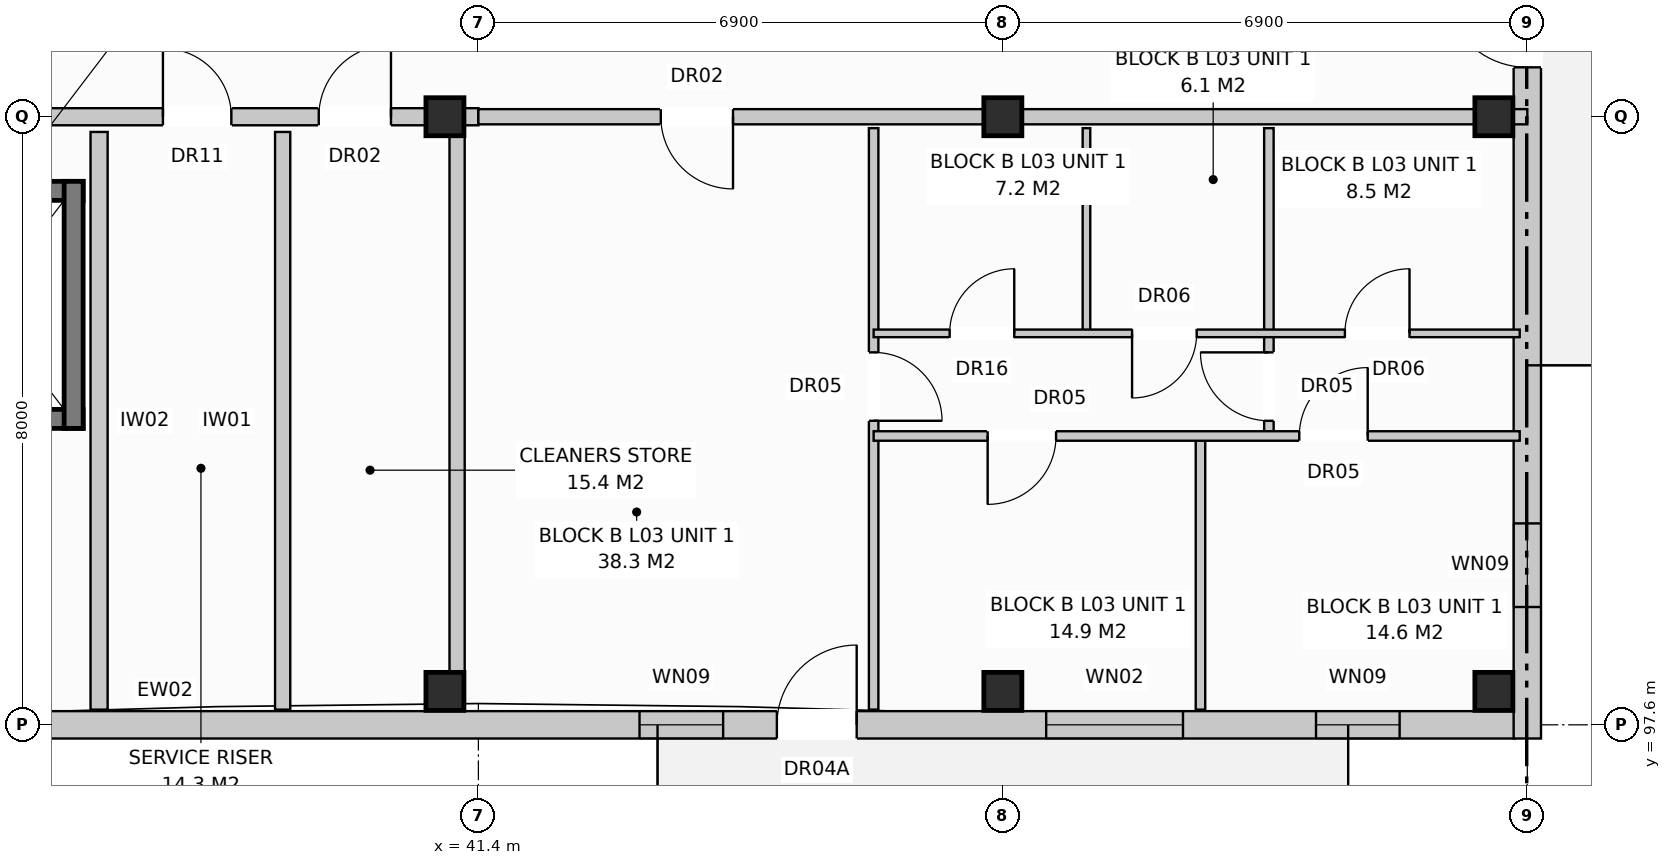
"""IFC4 building model, lengths in metres.
Left out: names, types, materials, properties, quantities, classifications, styles, units other than length and angle.
Written with IfcOpenShell. Run it as: python <this file> out.ifc"""

import sys

from ifc_helpers import new_model, si_unit, direction, frame, frame_2d, origin, origin_with_axes, origin_2d, place, context, subcontext, project, spatial, rectangle, extrude, element, fill, save


model = new_model("IFC4")
c1 = context("Model", 3, precision=1e-05, world=origin(), true_north=direction((0.0, 1.0)))
c2 = subcontext(c1, "Body", "Model", "MODEL_VIEW")
j1 = project(units=[si_unit("LENGTHUNIT", "METRE"), si_unit("PLANEANGLEUNIT", "RADIAN")], contexts=[c1])
p1 = place(None, origin())
s1 = spatial("IfcSite", under=j1, at=p1, CompositionType="ELEMENT")
p2 = place(p1, origin())
s2 = spatial("IfcBuilding", under=s1, at=p2, CompositionType="ELEMENT")
p3 = place(p2, frame((0.0, 0.0, 11.2)))
s3 = spatial("IfcBuildingStorey", under=s2, at=p3, CompositionType="ELEMENT", Elevation=11.2)
for number, where, z_axis, x_axis in (
    (1, (40.96, 98.04, 0.0), (0.0, 0.0, 1.0), (1.0, 0.0, 0.0)),
    (2, (40.96, 105.6, 0.0), (0.0, 0.0, 1.0), (1.0, 0.0, 0.0)),
    (3, (48.3, 98.04, 0.0), (0.0, 0.0, 1.0), (1.0, 0.0, 0.0)),
    (4, (48.3, 105.6, 0.0), (0.0, 0.0, 1.0), (1.0, 0.0, 0.0)),
    (5, (54.76, 98.04, 0.0), (0.0, 0.0, 1.0), (1.0, 0.0, 0.0)),
    (6, (54.76, 105.6, 0.0), (0.0, 0.0, 1.0), (1.0, 0.0, 0.0)),
):
    element("IfcColumn", number, at=place(p3, frame(where, z_axis=z_axis, x_axis=x_axis)), inside=s3, PredefinedType="COLUMN", context=c2, shape_type="SweptSolid", body=[
        extrude(rectangle(XDim=0.5, YDim=0.5, at=origin_2d()), origin(), (0.0, 0.0, 1.0), 3.2),
    ])
p4 = place(p3, frame((31.35, 97.6, 0.0), z_axis=(0.0, 0.0, 1.0), x_axis=(1.0, 0.0, 0.0)))
e7 = element("IfcWall", 7, at=p4, inside=s3, PredefinedType="STANDARD", context=c2, shape_type="SweptSolid", body=[
    extrude(rectangle(XDim=23.68, YDim=0.36, at=frame_2d((11.84, 0.0))), origin(), (0.0, 0.0, 1.0), 2.94),
])
p5 = place(p4, frame((13.977, 0.0, 0.0)))
e8 = element("IfcOpeningElement", 8, at=p5, cuts=e7, PredefinedType="OPENING", context=c2, shape_type="SweptSolid", body=[
    extrude(rectangle(XDim=1.05, YDim=2.12, at=frame_2d((0.525, 1.06))), frame((0.0, 0.192, 0.0), z_axis=(0.0, -1.0, 0.0), x_axis=(1.0, 0.0, 0.0)), (0.0, 0.0, 1.0), 0.384),
])
p6 = place(p4, frame((12.17, 0.0, 0.72)))
e9 = element("IfcOpeningElement", 9, at=p6, cuts=e7, PredefinedType="OPENING", context=c2, shape_type="SweptSolid", body=[
    extrude(rectangle(XDim=1.1, YDim=1.5, at=frame_2d((0.55, 0.75))), frame((0.0, 0.192, 0.0), z_axis=(0.0, -1.0, 0.0), x_axis=(1.0, 0.0, 0.0)), (0.0, 0.0, 1.0), 0.384),
])
p7 = place(p4, frame((17.52, 0.0, 0.8)))
e10 = element("IfcOpeningElement", 10, at=p7, cuts=e7, PredefinedType="OPENING", context=c2, shape_type="SweptSolid", body=[
    extrude(rectangle(XDim=1.8, YDim=1.7, at=frame_2d((0.9, 0.85))), frame((0.0, 0.192, 0.0), z_axis=(0.0, -1.0, 0.0), x_axis=(1.0, 0.0, 0.0)), (0.0, 0.0, 1.0), 0.384),
])
p8 = place(p4, frame((21.07, 0.0, 0.72)))
e11 = element("IfcOpeningElement", 11, at=p8, cuts=e7, PredefinedType="OPENING", context=c2, shape_type="SweptSolid", body=[
    extrude(rectangle(XDim=1.1, YDim=1.5, at=frame_2d((0.55, 0.75))), frame((0.0, 0.192, 0.0), z_axis=(0.0, -1.0, 0.0), x_axis=(1.0, 0.0, 0.0)), (0.0, 0.0, 1.0), 0.384),
])
p9 = place(p3, frame((55.2, 97.42, 0.0), z_axis=(0.0, 0.0, 1.0), x_axis=(0.0, 1.0, 0.0)))
e12 = element("IfcWall", 12, at=p9, inside=s3, PredefinedType="STANDARD", context=c2, shape_type="SweptSolid", body=[
    extrude(rectangle(XDim=18.76, YDim=0.36, at=frame_2d((9.38, 0.0))), origin(), (0.0, 0.0, 1.0), 2.94),
])
p10 = place(p9, frame((8.83, 0.0, 0.0)))
e13 = element("IfcOpeningElement", 13, at=p10, cuts=e12, PredefinedType="OPENING", context=c2, shape_type="SweptSolid", body=[
    extrude(rectangle(XDim=1.1, YDim=2.1, at=frame_2d((0.55, 1.05))), frame((0.0, 0.192, 0.0), z_axis=(0.0, -1.0, 0.0), x_axis=(1.0, 0.0, 0.0)), (0.0, 0.0, 1.0), 0.384),
])
p11 = place(p9, frame((1.73, 0.0, 0.72)))
e14 = element("IfcOpeningElement", 14, at=p11, cuts=e12, PredefinedType="OPENING", context=c2, shape_type="SweptSolid", body=[
    extrude(rectangle(XDim=1.1, YDim=1.5, at=frame_2d((0.55, 0.75))), frame((0.0, 0.192, 0.0), z_axis=(0.0, -1.0, 0.0), x_axis=(1.0, 0.0, 0.0)), (0.0, 0.0, 1.0), 0.384),
])
p12 = place(p9, frame((15.93, 0.0, 0.72)))
e15 = element("IfcOpeningElement", 15, at=p12, cuts=e12, PredefinedType="OPENING", context=c2, shape_type="SweptSolid", body=[
    extrude(rectangle(XDim=1.1, YDim=1.5, at=frame_2d((0.55, 0.75))), frame((0.0, 0.192, 0.0), z_axis=(0.0, -1.0, 0.0), x_axis=(1.0, 0.0, 0.0)), (0.0, 0.0, 1.0), 0.384),
])
p13 = place(p3, frame((33.6, 101.625, 0.0), z_axis=(0.0, 0.0, 1.0), x_axis=(1.0, 0.0, 0.0)))
e16 = element("IfcWall", 16, at=p13, inside=s3, PredefinedType="SHEAR", context=c2, shape_type="SweptSolid", body=[
    extrude(rectangle(XDim=2.6, YDim=0.25, at=frame_2d((1.3, 0.0))), origin(), (0.0, 0.0, 1.0), 2.94),
])
p14 = place(p13, frame((0.925, 0.0, 0.0)))
e17 = element("IfcOpeningElement", 17, at=p14, cuts=e16, PredefinedType="OPENING", context=c2, shape_type="SweptSolid", body=[
    extrude(rectangle(XDim=1.0, YDim=2.1, at=frame_2d((0.5, 1.05))), frame((0.0, 0.137, 0.0), z_axis=(0.0, -1.0, 0.0), x_axis=(1.0, 0.0, 0.0)), (0.0, 0.0, 1.0), 0.274),
])
p15 = place(p3, frame((33.6, 104.625, 0.0), z_axis=(0.0, 0.0, 1.0), x_axis=(1.0, 0.0, 0.0)))
e18 = element("IfcWall", 18, at=p15, inside=s3, PredefinedType="SHEAR", context=c2, shape_type="SweptSolid", body=[
    extrude(rectangle(XDim=2.6, YDim=0.25, at=frame_2d((1.3, 0.0))), origin(), (0.0, 0.0, 1.0), 2.94),
])
p16 = place(p3, frame((36.075, 101.5, 0.0), z_axis=(0.0, 0.0, 1.0), x_axis=(0.0, 1.0, 0.0)))
e19 = element("IfcWall", 19, at=p16, inside=s3, PredefinedType="SHEAR", context=c2, shape_type="SweptSolid", body=[
    extrude(rectangle(XDim=3.25, YDim=0.25, at=frame_2d((1.625, 0.0))), origin(), (0.0, 0.0, 1.0), 2.94),
])
p17 = place(p3, frame((36.41, 97.8, 0.0), z_axis=(0.0, 0.0, 1.0), x_axis=(0.0, 1.0, 0.0)))
e20 = element("IfcWall", 20, at=p17, inside=s3, PredefinedType="PARTITIONING", context=c2, shape_type="SweptSolid", body=[
    extrude(rectangle(XDim=7.6, YDim=0.225, at=frame_2d((3.8, 0.0))), origin(), (0.0, 0.0, 1.0), 2.59),
])
for number, where, z_axis, x_axis in (
    (21, (38.825, 97.8, 0.0), (0.0, 0.0, 1.0), (0.0, 1.0, 0.0)),
    (22, (41.12, 97.8, 0.0), (0.0, 0.0, 1.0), (0.0, 1.0, 0.0)),
):
    element("IfcWall", number, at=place(p3, frame(where, z_axis=z_axis, x_axis=x_axis)), inside=s3, PredefinedType="PARTITIONING", context=c2, shape_type="SweptSolid", body=[
        extrude(rectangle(XDim=7.6, YDim=0.2, at=frame_2d((3.8, 0.0))), origin(), (0.0, 0.0, 1.0), 2.94),
    ])
p18 = place(p3, frame((31.5, 105.6, 0.0), z_axis=(0.0, 0.0, 1.0), x_axis=(1.0, 0.0, 0.0)))
e23 = element("IfcWall", 23, at=p18, inside=s3, PredefinedType="PARTITIONING", context=c2, shape_type="SweptSolid", body=[
    extrude(rectangle(XDim=9.9, YDim=0.225, at=frame_2d((4.95, 0.0))), origin(), (0.0, 0.0, 1.0), 2.38),
])
p19 = place(p18, frame((0.475, 0.0, 0.0)))
e24 = element("IfcOpeningElement", 24, at=p19, cuts=e23, PredefinedType="OPENING", context=c2, shape_type="SweptSolid", body=[
    extrude(rectangle(XDim=1.1, YDim=2.15, at=frame_2d((0.55, 1.075))), frame((0.0, 0.125, 0.0), z_axis=(0.0, -1.0, 0.0), x_axis=(1.0, 0.0, 0.0)), (0.0, 0.0, 1.0), 0.249),
])
p20 = place(p18, frame((5.75, 0.0, 0.0)))
e25 = element("IfcOpeningElement", 25, at=p20, cuts=e23, PredefinedType="OPENING", context=c2, shape_type="SweptSolid", body=[
    extrude(rectangle(XDim=0.9, YDim=2.1, at=frame_2d((0.45, 1.05))), frame((0.0, 0.125, 0.0), z_axis=(0.0, -1.0, 0.0), x_axis=(1.0, 0.0, 0.0)), (0.0, 0.0, 1.0), 0.249),
])
p21 = place(p18, frame((7.8, 0.0, 0.0)))
e26 = element("IfcOpeningElement", 26, at=p21, cuts=e23, PredefinedType="OPENING", context=c2, shape_type="SweptSolid", body=[
    extrude(rectangle(XDim=0.95, YDim=2.15, at=frame_2d((0.475, 1.075))), frame((0.0, 0.125, 0.0), z_axis=(0.0, -1.0, 0.0), x_axis=(1.0, 0.0, 0.0)), (0.0, 0.0, 1.0), 0.249),
])
p22 = place(p3, frame((41.4, 105.6, 0.0), z_axis=(0.0, 0.0, 1.0), x_axis=(1.0, 0.0, 0.0)))
e27 = element("IfcWall", 27, at=p22, inside=s3, PredefinedType="PARTITIONING", context=c2, shape_type="SweptSolid", body=[
    extrude(rectangle(XDim=13.8, YDim=0.2, at=frame_2d((6.9, 0.0))), origin(), (0.0, 0.0, 1.0), 2.38),
])
p23 = place(p22, frame((2.4, 0.0, 0.0)))
e28 = element("IfcOpeningElement", 28, at=p23, cuts=e27, PredefinedType="OPENING", context=c2, shape_type="SweptSolid", body=[
    extrude(rectangle(XDim=0.95, YDim=2.15, at=frame_2d((0.475, 1.075))), frame((0.0, 0.112, 0.0), z_axis=(0.0, -1.0, 0.0), x_axis=(1.0, 0.0, 0.0)), (0.0, 0.0, 1.0), 0.224),
])
p24 = place(p3, frame((46.6, 105.45, 0.0), z_axis=(0.0, 0.0, 1.0), x_axis=(0.0, -1.0, 0.0)))
e29 = element("IfcWall", 29, at=p24, inside=s3, PredefinedType="PARTITIONING", context=c2, shape_type="SweptSolid", body=[
    extrude(rectangle(XDim=7.65, YDim=0.125, at=frame_2d((3.825, 0.0))), origin(), (0.0, 0.0, 1.0), 2.94),
])
p25 = place(p24, frame((2.95, 0.0, 0.0)))
e30 = element("IfcOpeningElement", 30, at=p25, cuts=e29, PredefinedType="OPENING", context=c2, shape_type="SweptSolid", body=[
    extrude(rectangle(XDim=0.9, YDim=2.1, at=frame_2d((0.45, 1.05))), frame((0.0, 0.074, 0.0), z_axis=(0.0, -1.0, 0.0), x_axis=(1.0, 0.0, 0.0)), (0.0, 0.0, 1.0), 0.149),
])
p26 = place(p3, frame((49.4, 105.45, 0.0), z_axis=(0.0, 0.0, 1.0), x_axis=(0.0, -1.0, 0.0)))
e31 = element("IfcWall", 31, at=p26, inside=s3, PredefinedType="PARTITIONING", context=c2, shape_type="SweptSolid", body=[
    extrude(rectangle(XDim=2.7, YDim=0.1, at=frame_2d((1.35, 0.0))), origin(), (0.0, 0.0, 1.0), 2.94),
])
p27 = place(p3, frame((51.8, 105.45, 0.0), z_axis=(0.0, 0.0, 1.0), x_axis=(0.0, -1.0, 0.0)))
e32 = element("IfcWall", 32, at=p27, inside=s3, PredefinedType="PARTITIONING", context=c2, shape_type="SweptSolid", body=[
    extrude(rectangle(XDim=4.05, YDim=0.125, at=frame_2d((2.025, 0.0))), origin(), (0.0, 0.0, 1.0), 2.94),
])
p28 = place(p27, frame((2.95, 0.0, 0.0)))
e33 = element("IfcOpeningElement", 33, at=p28, cuts=e32, PredefinedType="OPENING", context=c2, shape_type="SweptSolid", body=[
    extrude(rectangle(XDim=0.9, YDim=2.1, at=frame_2d((0.45, 1.05))), frame((0.0, 0.074, 0.0), z_axis=(0.0, -1.0, 0.0), x_axis=(1.0, 0.0, 0.0)), (0.0, 0.0, 1.0), 0.149),
])
p29 = place(p3, frame((50.9, 101.4, 0.0), z_axis=(0.0, 0.0, 1.0), x_axis=(0.0, -1.0, 0.0)))
e34 = element("IfcWall", 34, at=p29, inside=s3, PredefinedType="PARTITIONING", context=c2, shape_type="SweptSolid", body=[
    extrude(rectangle(XDim=3.6, YDim=0.125, at=frame_2d((1.8, 0.0))), origin(), (0.0, 0.0, 1.0), 2.94),
])
p30 = place(p3, frame((46.6, 102.75, 0.0), z_axis=(0.0, 0.0, 1.0), x_axis=(1.0, 0.0, 0.0)))
e35 = element("IfcWall", 35, at=p30, inside=s3, PredefinedType="PARTITIONING", context=c2, shape_type="SweptSolid", body=[
    extrude(rectangle(XDim=8.5, YDim=0.1, at=frame_2d((4.25, 0.0))), origin(), (0.0, 0.0, 1.0), 2.94),
])
p31 = place(p30, frame((1.0, 0.0, 0.0)))
e36 = element("IfcOpeningElement", 36, at=p31, cuts=e35, PredefinedType="OPENING", context=c2, shape_type="SweptSolid", body=[
    extrude(rectangle(XDim=0.85, YDim=2.1, at=frame_2d((0.425, 1.05))), frame((0.0, 0.062, 0.0), z_axis=(0.0, -1.0, 0.0), x_axis=(1.0, 0.0, 0.0)), (0.0, 0.0, 1.0), 0.124),
])
p32 = place(p30, frame((3.4, 0.0, 0.0)))
e37 = element("IfcOpeningElement", 37, at=p32, cuts=e35, PredefinedType="OPENING", context=c2, shape_type="SweptSolid", body=[
    extrude(rectangle(XDim=0.85, YDim=2.05, at=frame_2d((0.425, 1.025))), frame((0.0, 0.062, 0.0), z_axis=(0.0, -1.0, 0.0), x_axis=(1.0, 0.0, 0.0)), (0.0, 0.0, 1.0), 0.124),
])
p33 = place(p30, frame((6.2, 0.0, 0.0)))
e38 = element("IfcOpeningElement", 38, at=p33, cuts=e35, PredefinedType="OPENING", context=c2, shape_type="SweptSolid", body=[
    extrude(rectangle(XDim=0.85, YDim=2.05, at=frame_2d((0.425, 1.025))), frame((0.0, 0.062, 0.0), z_axis=(0.0, -1.0, 0.0), x_axis=(1.0, 0.0, 0.0)), (0.0, 0.0, 1.0), 0.124),
])
p34 = place(p3, frame((46.6, 101.4, 0.0), z_axis=(0.0, 0.0, 1.0), x_axis=(1.0, 0.0, 0.0)))
e39 = element("IfcWall", 39, at=p34, inside=s3, PredefinedType="PARTITIONING", context=c2, shape_type="SweptSolid", body=[
    extrude(rectangle(XDim=8.5, YDim=0.125, at=frame_2d((4.25, 0.0))), origin(), (0.0, 0.0, 1.0), 2.94),
])
p35 = place(p34, frame((1.5, 0.0, 0.0)))
e40 = element("IfcOpeningElement", 40, at=p35, cuts=e39, PredefinedType="OPENING", context=c2, shape_type="SweptSolid", body=[
    extrude(rectangle(XDim=0.9, YDim=2.1, at=frame_2d((0.45, 1.05))), frame((0.0, 0.074, 0.0), z_axis=(0.0, -1.0, 0.0), x_axis=(1.0, 0.0, 0.0)), (0.0, 0.0, 1.0), 0.149),
])
p36 = place(p34, frame((5.6, 0.0, 0.0)))
e41 = element("IfcOpeningElement", 41, at=p36, cuts=e39, PredefinedType="OPENING", context=c2, shape_type="SweptSolid", body=[
    extrude(rectangle(XDim=0.9, YDim=2.1, at=frame_2d((0.45, 1.05))), frame((0.0, 0.074, 0.0), z_axis=(0.0, -1.0, 0.0), x_axis=(1.0, 0.0, 0.0)), (0.0, 0.0, 1.0), 0.149),
])
p37 = place(p5, origin_with_axes())
e42 = element("IfcDoor", 42, at=p37, inside=s3, OperationType="SINGLE_SWING_RIGHT", PredefinedType="DOOR", context=c2, shape_type="SweptSolid", body=[
    extrude(rectangle(XDim=1.05, YDim=2.12, at=frame_2d((0.525, 1.06))), frame((0.0, 0.025, 0.0), z_axis=(0.0, -1.0, 0.0), x_axis=(1.0, 0.0, 0.0)), (0.0, 0.0, 1.0), 0.05),
])
fill(e8, e42)
p38 = place(p6, origin_with_axes())
e43 = element("IfcWindow", 43, at=p38, inside=s3, PartitioningType="SINGLE_PANEL", PredefinedType="WINDOW", context=c2, shape_type="SweptSolid", body=[
    extrude(rectangle(XDim=1.1, YDim=1.5, at=frame_2d((0.55, 0.75))), frame((0.0, 0.03, 0.0), z_axis=(0.0, -1.0, 0.0), x_axis=(1.0, 0.0, 0.0)), (0.0, 0.0, 1.0), 0.06),
])
fill(e9, e43)
p39 = place(p7, origin_with_axes())
e44 = element("IfcWindow", 44, at=p39, inside=s3, PartitioningType="SINGLE_PANEL", PredefinedType="WINDOW", context=c2, shape_type="SweptSolid", body=[
    extrude(rectangle(XDim=1.8, YDim=1.7, at=frame_2d((0.9, 0.85))), frame((0.0, 0.03, 0.0), z_axis=(0.0, -1.0, 0.0), x_axis=(1.0, 0.0, 0.0)), (0.0, 0.0, 1.0), 0.06),
])
fill(e10, e44)
p40 = place(p8, origin_with_axes())
e45 = element("IfcWindow", 45, at=p40, inside=s3, PartitioningType="SINGLE_PANEL", PredefinedType="WINDOW", context=c2, shape_type="SweptSolid", body=[
    extrude(rectangle(XDim=1.1, YDim=1.5, at=frame_2d((0.55, 0.75))), frame((0.0, 0.03, 0.0), z_axis=(0.0, -1.0, 0.0), x_axis=(1.0, 0.0, 0.0)), (0.0, 0.0, 1.0), 0.06),
])
fill(e11, e45)
p41 = place(p10, origin_with_axes())
e46 = element("IfcDoor", 46, at=p41, inside=s3, OperationType="SINGLE_SWING_RIGHT", PredefinedType="DOOR", context=c2, shape_type="SweptSolid", body=[
    extrude(rectangle(XDim=1.1, YDim=2.1, at=frame_2d((0.55, 1.05))), frame((0.0, 0.025, 0.0), z_axis=(0.0, -1.0, 0.0), x_axis=(1.0, 0.0, 0.0)), (0.0, 0.0, 1.0), 0.05),
])
fill(e13, e46)
p42 = place(p11, origin_with_axes())
e47 = element("IfcWindow", 47, at=p42, inside=s3, PartitioningType="SINGLE_PANEL", PredefinedType="WINDOW", context=c2, shape_type="SweptSolid", body=[
    extrude(rectangle(XDim=1.1, YDim=1.5, at=frame_2d((0.55, 0.75))), frame((0.0, 0.03, 0.0), z_axis=(0.0, -1.0, 0.0), x_axis=(1.0, 0.0, 0.0)), (0.0, 0.0, 1.0), 0.06),
])
fill(e14, e47)
p43 = place(p20, origin_with_axes())
e48 = element("IfcDoor", 48, at=p43, inside=s3, OperationType="SINGLE_SWING_LEFT", PredefinedType="DOOR", context=c2, shape_type="SweptSolid", body=[
    extrude(rectangle(XDim=0.9, YDim=2.1, at=frame_2d((0.45, 1.05))), frame((0.0, 0.025, 0.0), z_axis=(0.0, -1.0, 0.0), x_axis=(1.0, 0.0, 0.0)), (0.0, 0.0, 1.0), 0.05),
])
fill(e25, e48)
p44 = place(p21, origin_with_axes())
e49 = element("IfcDoor", 49, at=p44, inside=s3, OperationType="SINGLE_SWING_RIGHT", PredefinedType="DOOR", context=c2, shape_type="SweptSolid", body=[
    extrude(rectangle(XDim=0.95, YDim=2.15, at=frame_2d((0.475, 1.075))), frame((0.0, 0.025, 0.0), z_axis=(0.0, -1.0, 0.0), x_axis=(1.0, 0.0, 0.0)), (0.0, 0.0, 1.0), 0.05),
])
fill(e26, e49)
p45 = place(p23, frame((0.95, 0.0, 0.0), z_axis=(0.0, 0.0, 1.0), x_axis=(-1.0, 0.0, 0.0)))
e50 = element("IfcDoor", 50, at=p45, inside=s3, OperationType="SINGLE_SWING_RIGHT", PredefinedType="DOOR", context=c2, shape_type="SweptSolid", body=[
    extrude(rectangle(XDim=0.95, YDim=2.15, at=frame_2d((0.475, 1.075))), frame((0.0, 0.025, 0.0), z_axis=(0.0, -1.0, 0.0), x_axis=(1.0, 0.0, 0.0)), (0.0, 0.0, 1.0), 0.05),
])
fill(e28, e50)
p46 = place(p25, origin_with_axes())
e51 = element("IfcDoor", 51, at=p46, inside=s3, OperationType="SINGLE_SWING_RIGHT", PredefinedType="DOOR", context=c2, shape_type="SweptSolid", body=[
    extrude(rectangle(XDim=0.9, YDim=2.1, at=frame_2d((0.45, 1.05))), frame((0.0, 0.025, 0.0), z_axis=(0.0, -1.0, 0.0), x_axis=(1.0, 0.0, 0.0)), (0.0, 0.0, 1.0), 0.05),
])
fill(e30, e51)
p47 = place(p28, frame((0.9, 0.0, 0.0), z_axis=(0.0, 0.0, 1.0), x_axis=(-1.0, 0.0, 0.0)))
e52 = element("IfcDoor", 52, at=p47, inside=s3, OperationType="SINGLE_SWING_LEFT", PredefinedType="DOOR", context=c2, shape_type="SweptSolid", body=[
    extrude(rectangle(XDim=0.9, YDim=2.1, at=frame_2d((0.45, 1.05))), frame((0.0, 0.025, 0.0), z_axis=(0.0, -1.0, 0.0), x_axis=(1.0, 0.0, 0.0)), (0.0, 0.0, 1.0), 0.05),
])
fill(e33, e52)
p48 = place(p31, origin_with_axes())
e53 = element("IfcDoor", 53, at=p48, inside=s3, OperationType="SINGLE_SWING_RIGHT", PredefinedType="DOOR", context=c2, shape_type="SweptSolid", body=[
    extrude(rectangle(XDim=0.85, YDim=2.1, at=frame_2d((0.425, 1.05))), frame((0.0, 0.025, 0.0), z_axis=(0.0, -1.0, 0.0), x_axis=(1.0, 0.0, 0.0)), (0.0, 0.0, 1.0), 0.05),
])
fill(e36, e53)
p49 = place(p32, frame((0.85, 0.0, 0.0), z_axis=(0.0, 0.0, 1.0), x_axis=(-1.0, 0.0, 0.0)))
e54 = element("IfcDoor", 54, at=p49, inside=s3, OperationType="SINGLE_SWING_LEFT", PredefinedType="DOOR", context=c2, shape_type="SweptSolid", body=[
    extrude(rectangle(XDim=0.85, YDim=2.05, at=frame_2d((0.425, 1.025))), frame((0.0, 0.025, 0.0), z_axis=(0.0, -1.0, 0.0), x_axis=(1.0, 0.0, 0.0)), (0.0, 0.0, 1.0), 0.05),
])
fill(e37, e54)
p50 = place(p33, origin_with_axes())
e55 = element("IfcDoor", 55, at=p50, inside=s3, OperationType="SINGLE_SWING_RIGHT", PredefinedType="DOOR", context=c2, shape_type="SweptSolid", body=[
    extrude(rectangle(XDim=0.85, YDim=2.05, at=frame_2d((0.425, 1.025))), frame((0.0, 0.025, 0.0), z_axis=(0.0, -1.0, 0.0), x_axis=(1.0, 0.0, 0.0)), (0.0, 0.0, 1.0), 0.05),
])
fill(e38, e55)
p51 = place(p35, frame((0.9, 0.0, 0.0), z_axis=(0.0, 0.0, 1.0), x_axis=(-1.0, 0.0, 0.0)))
e56 = element("IfcDoor", 56, at=p51, inside=s3, OperationType="SINGLE_SWING_LEFT", PredefinedType="DOOR", context=c2, shape_type="SweptSolid", body=[
    extrude(rectangle(XDim=0.9, YDim=2.1, at=frame_2d((0.45, 1.05))), frame((0.0, 0.025, 0.0), z_axis=(0.0, -1.0, 0.0), x_axis=(1.0, 0.0, 0.0)), (0.0, 0.0, 1.0), 0.05),
])
fill(e40, e56)
p52 = place(p36, origin_with_axes())
e57 = element("IfcDoor", 57, at=p52, inside=s3, OperationType="SINGLE_SWING_RIGHT", PredefinedType="DOOR", context=c2, shape_type="SweptSolid", body=[
    extrude(rectangle(XDim=0.9, YDim=2.1, at=frame_2d((0.45, 1.05))), frame((0.0, 0.025, 0.0), z_axis=(0.0, -1.0, 0.0), x_axis=(1.0, 0.0, 0.0)), (0.0, 0.0, 1.0), 0.05),
])
fill(e41, e57)
save(model, sys.argv[1])
